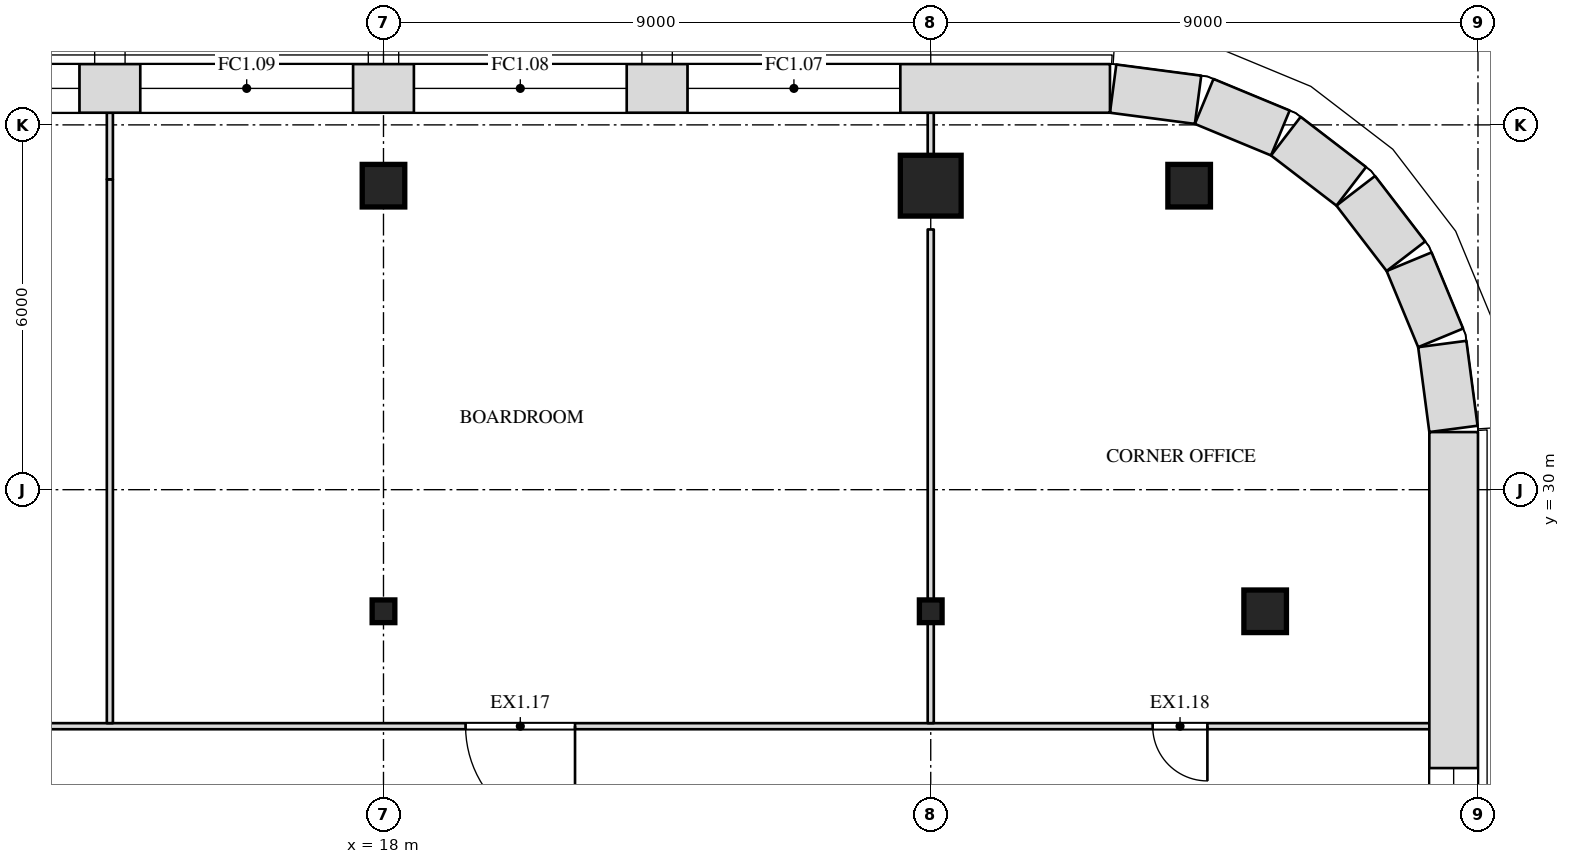
"""IFC4 building model, lengths in metres.
Left out: names, types, materials, properties, quantities, classifications, styles, units other than length and angle.
Written with IfcOpenShell. Run it as: python <this file> out.ifc"""

import sys

from ifc_helpers import new_model, si_unit, direction, frame, frame_2d, origin, origin_2d, place, context, subcontext, project, spatial, rectangle, i_section, extrude, element, fill, save


model = new_model("IFC4")
c1 = context("Model", 3, precision=1e-05, world=origin(), true_north=direction((0.0, 1.0)))
c2 = subcontext(c1, "Body", "Model", "MODEL_VIEW")
j1 = project(units=[si_unit("LENGTHUNIT", "METRE"), si_unit("PLANEANGLEUNIT", "RADIAN")], contexts=[c1])
p1 = place(None, origin())
s1 = spatial("IfcSite", under=j1, at=p1, CompositionType="ELEMENT")
p2 = place(p1, origin())
s2 = spatial("IfcBuilding", under=s1, at=p2, CompositionType="ELEMENT")
p3 = place(p2, frame((0.0, 0.0, 272.5)))
s3 = spatial("IfcBuildingStorey", under=s2, at=p3, CompositionType="ELEMENT", Elevation=272.5)
for number, where, z_axis, x_axis in (
    (1, (18.0, 28.0, 0.0), (0.0, 0.0, 1.0), (1.0, 0.0, 0.0)),
    (2, (27.0, 28.0, 0.0), (0.0, 0.0, 1.0), (1.0, 0.0, 0.0)),
):
    element("IfcColumn", number, at=place(p3, frame(where, z_axis=z_axis, x_axis=x_axis)), inside=s3, PredefinedType="COLUMN", context=c2, shape_type="SweptSolid", body=[
        extrude(i_section(OverallWidth=0.373, OverallDepth=0.373, WebThickness=0.016, FlangeThickness=0.026, at=origin_2d()), origin(), (0.0, 0.0, 1.0), 4.0),
    ])
for number, where, z_axis, x_axis in (
    (3, (32.5, 28.0, 0.0), (0.0, 0.0, 1.0), (1.0, 0.0, 0.0)),
    (4, (18.0, 35.0, 0.0), (0.0, 0.0, 1.0), (1.0, 0.0, 0.0)),
):
    element("IfcColumn", number, at=place(p3, frame(where, z_axis=z_axis, x_axis=x_axis)), inside=s3, PredefinedType="COLUMN", context=c2, shape_type="SweptSolid", body=[
        extrude(rectangle(XDim=0.7, YDim=0.7, at=origin_2d()), origin(), (0.0, 0.0, 1.0), 4.0),
    ])
p4 = place(p3, frame((27.0, 35.0, 0.0), z_axis=(0.0, 0.0, 1.0), x_axis=(1.0, 0.0, 0.0)))
e5 = element("IfcColumn", 5, at=p4, inside=s3, PredefinedType="COLUMN", context=c2, shape_type="SweptSolid", body=[
    extrude(rectangle(XDim=1.0, YDim=1.0, at=origin_2d()), origin(), (0.0, 0.0, 1.0), 4.0),
])
p5 = place(p3, frame((31.25, 35.0, 0.0), z_axis=(0.0, 0.0, 1.0), x_axis=(1.0, 0.0, 0.0)))
e6 = element("IfcColumn", 6, at=p5, inside=s3, PredefinedType="COLUMN", context=c2, shape_type="SweptSolid", body=[
    extrude(rectangle(XDim=0.7, YDim=0.7, at=origin_2d()), origin(), (0.0, 0.0, 1.0), 4.0),
])
p6 = place(p3, frame((-35.2, 26.11, 0.0), z_axis=(0.0, 0.0, 1.0), x_axis=(1.0, 0.0, 0.0)))
e7 = element("IfcWall", 7, at=p6, inside=s3, PredefinedType="PARTITIONING", context=c2, shape_type="SweptSolid", body=[
    extrude(rectangle(XDim=70.4, YDim=0.1, at=frame_2d((35.2, 0.0))), origin(), (0.0, 0.0, 1.0), 3.78),
])
p7 = place(p6, frame((3.65, 0.0, 0.0)))
e8 = element("IfcOpeningElement", 8, at=p7, cuts=e7, PredefinedType="OPENING", context=c2, shape_type="SweptSolid", body=[
    extrude(rectangle(XDim=0.9, YDim=2.1, at=frame_2d((0.45, 1.05))), frame((0.0, 0.062, 0.0), z_axis=(0.0, -1.0, 0.0), x_axis=(1.0, 0.0, 0.0)), (0.0, 0.0, 1.0), 0.124),
])
p8 = place(p6, frame((14.05, 0.0, 0.0)))
e9 = element("IfcOpeningElement", 9, at=p8, cuts=e7, PredefinedType="OPENING", context=c2, shape_type="SweptSolid", body=[
    extrude(rectangle(XDim=1.8, YDim=2.1, at=frame_2d((0.9, 1.05))), frame((0.0, 0.062, 0.0), z_axis=(0.0, -1.0, 0.0), x_axis=(1.0, 0.0, 0.0)), (0.0, 0.0, 1.0), 0.124),
])
p9 = place(p6, frame((28.0, 0.0, 0.0)))
e10 = element("IfcOpeningElement", 10, at=p9, cuts=e7, PredefinedType="OPENING", context=c2, shape_type="SweptSolid", body=[
    extrude(rectangle(XDim=0.9, YDim=2.1, at=frame_2d((0.45, 1.05))), frame((0.0, 0.062, 0.0), z_axis=(0.0, -1.0, 0.0), x_axis=(1.0, 0.0, 0.0)), (0.0, 0.0, 1.0), 0.124),
])
p10 = place(p6, frame((41.5, 0.0, 0.0)))
e11 = element("IfcOpeningElement", 11, at=p10, cuts=e7, PredefinedType="OPENING", context=c2, shape_type="SweptSolid", body=[
    extrude(rectangle(XDim=0.9, YDim=2.1, at=frame_2d((0.45, 1.05))), frame((0.0, 0.062, 0.0), z_axis=(0.0, -1.0, 0.0), x_axis=(1.0, 0.0, 0.0)), (0.0, 0.0, 1.0), 0.124),
])
p11 = place(p6, frame((54.55, 0.0, 0.0)))
e12 = element("IfcOpeningElement", 12, at=p11, cuts=e7, PredefinedType="OPENING", context=c2, shape_type="SweptSolid", body=[
    extrude(rectangle(XDim=1.8, YDim=2.1, at=frame_2d((0.9, 1.05))), frame((0.0, 0.062, 0.0), z_axis=(0.0, -1.0, 0.0), x_axis=(1.0, 0.0, 0.0)), (0.0, 0.0, 1.0), 0.124),
])
p12 = place(p6, frame((65.85, 0.0, 0.0)))
e13 = element("IfcOpeningElement", 13, at=p12, cuts=e7, PredefinedType="OPENING", context=c2, shape_type="SweptSolid", body=[
    extrude(rectangle(XDim=0.9, YDim=2.1, at=frame_2d((0.45, 1.05))), frame((0.0, 0.062, 0.0), z_axis=(0.0, -1.0, 0.0), x_axis=(1.0, 0.0, 0.0)), (0.0, 0.0, 1.0), 0.124),
])
p13 = place(p3, frame((13.5, 26.16, 0.0), z_axis=(0.0, 0.0, 1.0), x_axis=(0.0, 1.0, 0.0)))
e14 = element("IfcWall", 14, at=p13, inside=s3, PredefinedType="PARTITIONING", context=c2, shape_type="SweptSolid", body=[
    extrude(rectangle(XDim=8.945, YDim=0.1, at=frame_2d((4.472, 0.0))), origin(), (0.0, 0.0, 1.0), 3.247),
])
p14 = place(p3, frame((13.5, 35.104, 0.0), z_axis=(0.0, 0.0, 1.0), x_axis=(0.0, 1.0, 0.0)))
e15 = element("IfcWall", 15, at=p14, inside=s3, PredefinedType="PARTITIONING", context=c2, shape_type="SweptSolid", body=[
    extrude(rectangle(XDim=1.095, YDim=0.1, at=frame_2d((0.548, 0.0))), origin(), (0.0, 0.0, 1.0), 3.78),
])
p15 = place(p3, frame((27.0, 26.16, 0.0), z_axis=(0.0, 0.0, 1.0), x_axis=(0.0, 1.0, 0.0)))
e16 = element("IfcWall", 16, at=p15, inside=s3, PredefinedType="PARTITIONING", context=c2, shape_type="SweptSolid", body=[
    extrude(rectangle(XDim=1.653, YDim=0.1, at=frame_2d((0.827, 0.0))), origin(), (0.0, 0.0, 1.0), 3.247),
])
p16 = place(p3, frame((27.0, 28.187, 0.0), z_axis=(0.0, 0.0, 1.0), x_axis=(0.0, 1.0, 0.0)))
e17 = element("IfcWall", 17, at=p16, inside=s3, PredefinedType="PARTITIONING", context=c2, shape_type="SweptSolid", body=[
    extrude(rectangle(XDim=6.093, YDim=0.1, at=frame_2d((3.047, 0.0))), origin(), (0.0, 0.0, 1.0), 3.247),
])
p17 = place(p3, frame((27.0, 35.5, 0.0), z_axis=(0.0, 0.0, 1.0), x_axis=(0.0, 1.0, 0.0)))
e18 = element("IfcWall", 18, at=p17, inside=s3, PredefinedType="PARTITIONING", context=c2, shape_type="SweptSolid", body=[
    extrude(rectangle(XDim=0.7, YDim=0.1, at=frame_2d((0.35, 0.0))), origin(), (0.0, 0.0, 1.0), 3.78),
])
p18 = place(p3, frame((35.6, -7.948, 0.0), z_axis=(0.0, 0.0, 1.0), x_axis=(0.0, 1.0, 0.0)))
e19 = element("IfcWall", 19, at=p18, inside=s3, PredefinedType="SOLIDWALL", context=c2, shape_type="SweptSolid", body=[
    extrude(rectangle(XDim=38.895, YDim=0.8, at=frame_2d((19.448, 0.0))), origin(), (0.0, 0.0, 1.0), 3.78),
])
p19 = place(p18, frame((5.526, 0.0, 1.0)))
e20 = element("IfcOpeningElement", 20, at=p19, cuts=e19, PredefinedType="OPENING", context=c2, shape_type="SweptSolid", body=[
    extrude(rectangle(XDim=3.5, YDim=2.5, at=frame_2d((1.75, 1.25))), frame((0.0, 0.412, 0.0), z_axis=(0.0, -1.0, 0.0), x_axis=(1.0, 0.0, 0.0)), (0.0, 0.0, 1.0), 0.824),
])
p20 = place(p18, frame((10.395, 0.0, 1.0)))
e21 = element("IfcOpeningElement", 21, at=p20, cuts=e19, PredefinedType="OPENING", context=c2, shape_type="SweptSolid", body=[
    extrude(rectangle(XDim=3.5, YDim=2.5, at=frame_2d((1.75, 1.25))), frame((0.0, 0.412, 0.0), z_axis=(0.0, -1.0, 0.0), x_axis=(1.0, 0.0, 0.0)), (0.0, 0.0, 1.0), 0.824),
])
p21 = place(p18, frame((15.263, 0.0, 1.0)))
e22 = element("IfcOpeningElement", 22, at=p21, cuts=e19, PredefinedType="OPENING", context=c2, shape_type="SweptSolid", body=[
    extrude(rectangle(XDim=3.5, YDim=2.5, at=frame_2d((1.75, 1.25))), frame((0.0, 0.412, 0.0), z_axis=(0.0, -1.0, 0.0), x_axis=(1.0, 0.0, 0.0)), (0.0, 0.0, 1.0), 0.824),
])
p22 = place(p18, frame((20.132, 0.0, 1.0)))
e23 = element("IfcOpeningElement", 23, at=p22, cuts=e19, PredefinedType="OPENING", context=c2, shape_type="SweptSolid", body=[
    extrude(rectangle(XDim=3.5, YDim=2.5, at=frame_2d((1.75, 1.25))), frame((0.0, 0.412, 0.0), z_axis=(0.0, -1.0, 0.0), x_axis=(1.0, 0.0, 0.0)), (0.0, 0.0, 1.0), 0.824),
])
p23 = place(p18, frame((25.0, 0.0, 1.0)))
e24 = element("IfcOpeningElement", 24, at=p23, cuts=e19, PredefinedType="OPENING", context=c2, shape_type="SweptSolid", body=[
    extrude(rectangle(XDim=3.5, YDim=2.5, at=frame_2d((1.75, 1.25))), frame((0.0, 0.412, 0.0), z_axis=(0.0, -1.0, 0.0), x_axis=(1.0, 0.0, 0.0)), (0.0, 0.0, 1.0), 0.824),
])
p24 = place(p18, frame((29.869, 0.0, 1.0)))
e25 = element("IfcOpeningElement", 25, at=p24, cuts=e19, PredefinedType="OPENING", context=c2, shape_type="SweptSolid", body=[
    extrude(rectangle(XDim=3.5, YDim=2.5, at=frame_2d((1.75, 1.25))), frame((0.0, 0.412, 0.0), z_axis=(0.0, -1.0, 0.0), x_axis=(1.0, 0.0, 0.0)), (0.0, 0.0, 1.0), 0.824),
])
p25 = place(p3, frame((35.597, 31.0, 0.0), z_axis=(0.0, 0.0, 1.0), x_axis=(-0.130517283865, 0.99144603414, 0.0)))
e26 = element("IfcWall", 26, at=p25, inside=s3, PredefinedType="SOLIDWALL", context=c2, shape_type="SweptSolid", body=[
    extrude(rectangle(XDim=1.408, YDim=0.8, at=frame_2d((0.704, 0.0))), origin(), (0.0, 0.0, 1.0), 3.78),
])
p26 = place(p3, frame((35.386, 32.497, 0.0), z_axis=(0.0, 0.0, 1.0), x_axis=(-0.38276009378, 0.923847774587, 0.0)))
e27 = element("IfcWall", 27, at=p26, inside=s3, PredefinedType="SOLIDWALL", context=c2, shape_type="SweptSolid", body=[
    extrude(rectangle(XDim=1.355, YDim=0.8, at=frame_2d((0.678, 0.0))), origin(), (0.0, 0.0, 1.0), 3.78),
])
for number, where, z_axis, x_axis in (
    (28, (34.815, 33.84, 0.0), (0.0, 0.0, 1.0), (-0.609, 0.793, 0.0)),
    (29, (33.916, 34.989, 0.0), (0.0, 0.0, 1.0), (-0.793, 0.609, 0.0)),
):
    element("IfcWall", number, at=place(p3, frame(where, z_axis=z_axis, x_axis=x_axis)), inside=s3, PredefinedType="SOLIDWALL", context=c2, shape_type="SweptSolid", body=[
        extrude(rectangle(XDim=1.356, YDim=0.8, at=frame_2d((0.678, 0.0))), origin(), (0.0, 0.0, 1.0), 3.78),
    ])
p27 = place(p3, frame((32.75, 35.867, 0.0), z_axis=(0.0, 0.0, 1.0), x_axis=(-0.923847774587, 0.38276009378, 0.0)))
e30 = element("IfcWall", 30, at=p27, inside=s3, PredefinedType="SOLIDWALL", context=c2, shape_type="SweptSolid", body=[
    extrude(rectangle(XDim=1.355, YDim=0.8, at=frame_2d((0.678, 0.0))), origin(), (0.0, 0.0, 1.0), 3.78),
])
p28 = place(p3, frame((31.396, 36.413, 0.0), z_axis=(0.0, 0.0, 1.0), x_axis=(-0.99144603414, 0.130517283865, 0.0)))
e31 = element("IfcWall", 31, at=p28, inside=s3, PredefinedType="SOLIDWALL", context=c2, shape_type="SweptSolid", body=[
    extrude(rectangle(XDim=1.408, YDim=0.8, at=frame_2d((0.704, 0.0))), origin(), (0.0, 0.0, 1.0), 3.78),
])
p29 = place(p3, frame((29.948, 36.6, 0.0), z_axis=(0.0, 0.0, 1.0), x_axis=(-1.0, 0.0, 0.0)))
e32 = element("IfcWall", 32, at=p29, inside=s3, PredefinedType="SOLIDWALL", context=c2, shape_type="SweptSolid", body=[
    extrude(rectangle(XDim=59.895, YDim=0.8, at=frame_2d((29.948, 0.0))), origin(), (0.0, 0.0, 1.0), 3.78),
])
p30 = place(p29, frame((3.448, 0.0, 1.0)))
e33 = element("IfcOpeningElement", 33, at=p30, cuts=e32, PredefinedType="OPENING", context=c2, shape_type="SweptSolid", body=[
    extrude(rectangle(XDim=3.5, YDim=2.5, at=frame_2d((1.75, 1.25))), frame((0.0, 0.412, 0.0), z_axis=(0.0, -1.0, 0.0), x_axis=(1.0, 0.0, 0.0)), (0.0, 0.0, 1.0), 0.824),
])
p31 = place(p29, frame((7.948, 0.0, 1.0)))
e34 = element("IfcOpeningElement", 34, at=p31, cuts=e32, PredefinedType="OPENING", context=c2, shape_type="SweptSolid", body=[
    extrude(rectangle(XDim=3.5, YDim=2.5, at=frame_2d((1.75, 1.25))), frame((0.0, 0.412, 0.0), z_axis=(0.0, -1.0, 0.0), x_axis=(1.0, 0.0, 0.0)), (0.0, 0.0, 1.0), 0.824),
])
p32 = place(p29, frame((12.448, 0.0, 1.0)))
e35 = element("IfcOpeningElement", 35, at=p32, cuts=e32, PredefinedType="OPENING", context=c2, shape_type="SweptSolid", body=[
    extrude(rectangle(XDim=3.5, YDim=2.5, at=frame_2d((1.75, 1.25))), frame((0.0, 0.412, 0.0), z_axis=(0.0, -1.0, 0.0), x_axis=(1.0, 0.0, 0.0)), (0.0, 0.0, 1.0), 0.824),
])
p33 = place(p29, frame((16.948, 0.0, 1.0)))
e36 = element("IfcOpeningElement", 36, at=p33, cuts=e32, PredefinedType="OPENING", context=c2, shape_type="SweptSolid", body=[
    extrude(rectangle(XDim=3.5, YDim=2.5, at=frame_2d((1.75, 1.25))), frame((0.0, 0.412, 0.0), z_axis=(0.0, -1.0, 0.0), x_axis=(1.0, 0.0, 0.0)), (0.0, 0.0, 1.0), 0.824),
])
p34 = place(p29, frame((21.448, 0.0, 1.0)))
e37 = element("IfcOpeningElement", 37, at=p34, cuts=e32, PredefinedType="OPENING", context=c2, shape_type="SweptSolid", body=[
    extrude(rectangle(XDim=3.5, YDim=2.5, at=frame_2d((1.75, 1.25))), frame((0.0, 0.412, 0.0), z_axis=(0.0, -1.0, 0.0), x_axis=(1.0, 0.0, 0.0)), (0.0, 0.0, 1.0), 0.824),
])
p35 = place(p29, frame((25.948, 0.0, 1.0)))
e38 = element("IfcOpeningElement", 38, at=p35, cuts=e32, PredefinedType="OPENING", context=c2, shape_type="SweptSolid", body=[
    extrude(rectangle(XDim=3.5, YDim=2.5, at=frame_2d((1.75, 1.25))), frame((0.0, 0.412, 0.0), z_axis=(0.0, -1.0, 0.0), x_axis=(1.0, 0.0, 0.0)), (0.0, 0.0, 1.0), 0.824),
])
p36 = place(p29, frame((30.448, 0.0, 1.0)))
e39 = element("IfcOpeningElement", 39, at=p36, cuts=e32, PredefinedType="OPENING", context=c2, shape_type="SweptSolid", body=[
    extrude(rectangle(XDim=3.5, YDim=2.5, at=frame_2d((1.75, 1.25))), frame((0.0, 0.412, 0.0), z_axis=(0.0, -1.0, 0.0), x_axis=(1.0, 0.0, 0.0)), (0.0, 0.0, 1.0), 0.824),
])
p37 = place(p29, frame((34.948, 0.0, 1.0)))
e40 = element("IfcOpeningElement", 40, at=p37, cuts=e32, PredefinedType="OPENING", context=c2, shape_type="SweptSolid", body=[
    extrude(rectangle(XDim=3.5, YDim=2.5, at=frame_2d((1.75, 1.25))), frame((0.0, 0.412, 0.0), z_axis=(0.0, -1.0, 0.0), x_axis=(1.0, 0.0, 0.0)), (0.0, 0.0, 1.0), 0.824),
])
p38 = place(p29, frame((39.448, 0.0, 1.0)))
e41 = element("IfcOpeningElement", 41, at=p38, cuts=e32, PredefinedType="OPENING", context=c2, shape_type="SweptSolid", body=[
    extrude(rectangle(XDim=3.5, YDim=2.5, at=frame_2d((1.75, 1.25))), frame((0.0, 0.412, 0.0), z_axis=(0.0, -1.0, 0.0), x_axis=(1.0, 0.0, 0.0)), (0.0, 0.0, 1.0), 0.824),
])
p39 = place(p29, frame((43.948, 0.0, 1.0)))
e42 = element("IfcOpeningElement", 42, at=p39, cuts=e32, PredefinedType="OPENING", context=c2, shape_type="SweptSolid", body=[
    extrude(rectangle(XDim=3.5, YDim=2.5, at=frame_2d((1.75, 1.25))), frame((0.0, 0.412, 0.0), z_axis=(0.0, -1.0, 0.0), x_axis=(1.0, 0.0, 0.0)), (0.0, 0.0, 1.0), 0.824),
])
p40 = place(p29, frame((48.448, 0.0, 1.0)))
e43 = element("IfcOpeningElement", 43, at=p40, cuts=e32, PredefinedType="OPENING", context=c2, shape_type="SweptSolid", body=[
    extrude(rectangle(XDim=3.5, YDim=2.5, at=frame_2d((1.75, 1.25))), frame((0.0, 0.412, 0.0), z_axis=(0.0, -1.0, 0.0), x_axis=(1.0, 0.0, 0.0)), (0.0, 0.0, 1.0), 0.824),
])
p41 = place(p29, frame((52.948, 0.0, 1.0)))
e44 = element("IfcOpeningElement", 44, at=p41, cuts=e32, PredefinedType="OPENING", context=c2, shape_type="SweptSolid", body=[
    extrude(rectangle(XDim=3.5, YDim=2.5, at=frame_2d((1.75, 1.25))), frame((0.0, 0.412, 0.0), z_axis=(0.0, -1.0, 0.0), x_axis=(1.0, 0.0, 0.0)), (0.0, 0.0, 1.0), 0.824),
])
p42 = place(p11, origin())
e45 = element("IfcDoor", 45, at=p42, inside=s3, OperationType="DOUBLE_DOOR_SINGLE_SWING", PredefinedType="DOOR", context=c2, shape_type="SweptSolid", body=[
    extrude(rectangle(XDim=1.8, YDim=2.1, at=frame_2d((0.9, 1.05))), frame((0.0, 0.025, 0.0), z_axis=(0.0, -1.0, 0.0), x_axis=(1.0, 0.0, 0.0)), (0.0, 0.0, 1.0), 0.05),
])
fill(e12, e45)
p43 = place(p12, origin())
e46 = element("IfcDoor", 46, at=p43, inside=s3, OperationType="SINGLE_SWING_LEFT", PredefinedType="DOOR", context=c2, shape_type="SweptSolid", body=[
    extrude(rectangle(XDim=0.9, YDim=2.1, at=frame_2d((0.45, 1.05))), frame((0.0, 0.025, 0.0), z_axis=(0.0, -1.0, 0.0), x_axis=(1.0, 0.0, 0.0)), (0.0, 0.0, 1.0), 0.05),
])
fill(e13, e46)
p44 = place(p24, origin())
e47 = element("IfcWindow", 47, at=p44, inside=s3, PartitioningType="SINGLE_PANEL", PredefinedType="WINDOW", context=c2, shape_type="SweptSolid", body=[
    extrude(rectangle(XDim=3.5, YDim=2.5, at=frame_2d((1.75, 1.25))), frame((0.0, 0.03, 0.0), z_axis=(0.0, -1.0, 0.0), x_axis=(1.0, 0.0, 0.0)), (0.0, 0.0, 1.0), 0.06),
])
fill(e25, e47)
p45 = place(p30, origin())
e48 = element("IfcWindow", 48, at=p45, inside=s3, PartitioningType="SINGLE_PANEL", PredefinedType="WINDOW", context=c2, shape_type="SweptSolid", body=[
    extrude(rectangle(XDim=3.5, YDim=2.5, at=frame_2d((1.75, 1.25))), frame((0.0, 0.03, 0.0), z_axis=(0.0, -1.0, 0.0), x_axis=(1.0, 0.0, 0.0)), (0.0, 0.0, 1.0), 0.06),
])
fill(e33, e48)
p46 = place(p31, origin())
e49 = element("IfcWindow", 49, at=p46, inside=s3, PartitioningType="SINGLE_PANEL", PredefinedType="WINDOW", context=c2, shape_type="SweptSolid", body=[
    extrude(rectangle(XDim=3.5, YDim=2.5, at=frame_2d((1.75, 1.25))), frame((0.0, 0.03, 0.0), z_axis=(0.0, -1.0, 0.0), x_axis=(1.0, 0.0, 0.0)), (0.0, 0.0, 1.0), 0.06),
])
fill(e34, e49)
p47 = place(p32, origin())
e50 = element("IfcWindow", 50, at=p47, inside=s3, PartitioningType="SINGLE_PANEL", PredefinedType="WINDOW", context=c2, shape_type="SweptSolid", body=[
    extrude(rectangle(XDim=3.5, YDim=2.5, at=frame_2d((1.75, 1.25))), frame((0.0, 0.03, 0.0), z_axis=(0.0, -1.0, 0.0), x_axis=(1.0, 0.0, 0.0)), (0.0, 0.0, 1.0), 0.06),
])
fill(e35, e50)
p48 = place(p33, origin())
e51 = element("IfcWindow", 51, at=p48, inside=s3, PartitioningType="SINGLE_PANEL", PredefinedType="WINDOW", context=c2, shape_type="SweptSolid", body=[
    extrude(rectangle(XDim=3.5, YDim=2.5, at=frame_2d((1.75, 1.25))), frame((0.0, 0.03, 0.0), z_axis=(0.0, -1.0, 0.0), x_axis=(1.0, 0.0, 0.0)), (0.0, 0.0, 1.0), 0.06),
])
fill(e36, e51)
save(model, sys.argv[1])
